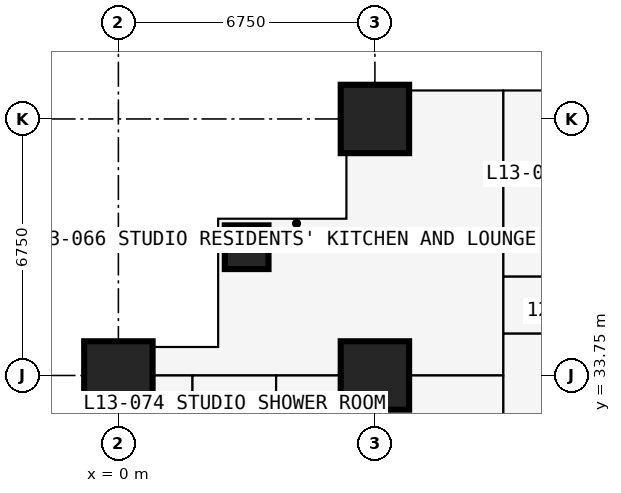
"""IFC4 building model, lengths in metres.
Left out: names, types, materials, properties, quantities, classifications, styles, units other than length and angle.
Written with IfcOpenShell. Run it as: python <this file> out.ifc"""

import sys

from ifc_helpers import new_model, si_unit, direction, frame, frame_2d, origin, origin_2d, place, context, subcontext, project, spatial, rectangle, extrude, element, fill, save


model = new_model("IFC4")
c1 = context("Model", 3, precision=1e-05, world=origin(), true_north=direction((0.0, 1.0)))
c2 = subcontext(c1, "Body", "Model", "MODEL_VIEW")
j1 = project(units=[si_unit("LENGTHUNIT", "METRE"), si_unit("PLANEANGLEUNIT", "RADIAN")], contexts=[c1])
p1 = place(None, origin())
s1 = spatial("IfcSite", under=j1, at=p1, CompositionType="ELEMENT")
p2 = place(p1, origin())
s2 = spatial("IfcBuilding", under=s1, at=p2, CompositionType="ELEMENT")
p3 = place(p2, frame((0.0, 0.0, 50.4)))
s3 = spatial("IfcBuildingStorey", under=s2, at=p3, CompositionType="ELEMENT", Elevation=50.4)
p4 = place(p3, frame((0.0, 33.75, 0.0), z_axis=(0.0, 0.0, 1.0), x_axis=(1.0, 0.0, 0.0)))
e1 = element("IfcColumn", 1, at=p4, inside=s3, PredefinedType="COLUMN", context=c2, shape_type="SweptSolid", body=[
    extrude(rectangle(XDim=1.8, YDim=1.8, at=origin_2d()), origin(), (0.0, 0.0, 1.0), 3.6),
])
p5 = place(p3, frame((3.375, 37.125, 0.0), z_axis=(0.0, 0.0, 1.0), x_axis=(1.0, 0.0, 0.0)))
e2 = element("IfcColumn", 2, at=p5, inside=s3, PredefinedType="COLUMN", context=c2, shape_type="SweptSolid", body=[
    extrude(rectangle(XDim=1.15, YDim=1.15, at=origin_2d()), origin(), (0.0, 0.0, 1.0), 3.6),
])
for number, where, z_axis, x_axis in (
    (3, (6.75, 33.75, 0.0), (0.0, 0.0, 1.0), (1.0, 0.0, 0.0)),
    (4, (6.75, 40.5, 0.0), (0.0, 0.0, 1.0), (1.0, 0.0, 0.0)),
):
    element("IfcColumn", number, at=place(p3, frame(where, z_axis=z_axis, x_axis=x_axis)), inside=s3, PredefinedType="COLUMN", context=c2, shape_type="SweptSolid", body=[
        extrude(rectangle(XDim=1.8, YDim=1.8, at=origin_2d()), origin(), (0.0, 0.0, 1.0), 3.6),
    ])
p6 = place(p3, frame((6.0, 41.25, 0.0), z_axis=(0.0, 0.0, 1.0), x_axis=(0.0, -1.0, 0.0)))
e5 = element("IfcWall", 5, at=p6, inside=s3, PredefinedType="SOLIDWALL", context=c2, shape_type="SweptSolid", body=[
    extrude(rectangle(XDim=3.375, YDim=0.3, at=frame_2d((1.688, 0.0))), origin(), (0.0, 0.0, 1.0), 3.375),
])
p7 = place(p6, frame((1.833, 0.0, 0.9)))
e6 = element("IfcOpeningElement", 6, at=p7, cuts=e5, PredefinedType="OPENING", context=c2, shape_type="SweptSolid", body=[
    extrude(rectangle(XDim=1.2, YDim=1.8, at=frame_2d((0.6, 0.9))), frame((0.0, 0.16, 0.0), z_axis=(0.0, -1.0, 0.0), x_axis=(1.0, 0.0, 0.0)), (0.0, 0.0, 1.0), 0.32),
])
p8 = place(p3, frame((6.0, 37.875, 0.0), z_axis=(0.0, 0.0, 1.0), x_axis=(-1.0, 0.0, 0.0)))
e7 = element("IfcWall", 7, at=p8, inside=s3, PredefinedType="SOLIDWALL", context=c2, shape_type="SweptSolid", body=[
    extrude(rectangle(XDim=3.375, YDim=0.3, at=frame_2d((1.688, 0.0))), origin(), (0.0, 0.0, 1.0), 3.375),
])
p9 = place(p8, frame((0.788, 0.0, 0.6)))
e8 = element("IfcOpeningElement", 8, at=p9, cuts=e7, PredefinedType="OPENING", context=c2, shape_type="SweptSolid", body=[
    extrude(rectangle(XDim=1.8, YDim=2.1, at=frame_2d((0.9, 1.05))), frame((0.0, 0.16, 0.0), z_axis=(0.0, -1.0, 0.0), x_axis=(1.0, 0.0, 0.0)), (0.0, 0.0, 1.0), 0.32),
])
p10 = place(p3, frame((2.625, 37.875, 0.0), z_axis=(0.0, 0.0, 1.0), x_axis=(0.0, -1.0, 0.0)))
e9 = element("IfcWall", 9, at=p10, inside=s3, PredefinedType="SOLIDWALL", context=c2, shape_type="SweptSolid", body=[
    extrude(rectangle(XDim=3.375, YDim=0.3, at=frame_2d((1.688, 0.0))), origin(), (0.0, 0.0, 1.0), 3.375),
])
p11 = place(p10, frame((0.788, 0.0, 0.6)))
e10 = element("IfcOpeningElement", 10, at=p11, cuts=e9, PredefinedType="OPENING", context=c2, shape_type="SweptSolid", body=[
    extrude(rectangle(XDim=1.8, YDim=2.1, at=frame_2d((0.9, 1.05))), frame((0.0, 0.16, 0.0), z_axis=(0.0, -1.0, 0.0), x_axis=(1.0, 0.0, 0.0)), (0.0, 0.0, 1.0), 0.32),
])
p12 = place(p3, frame((2.625, 34.5, 0.0), z_axis=(0.0, 0.0, 1.0), x_axis=(-1.0, 0.0, 0.0)))
e11 = element("IfcWall", 11, at=p12, inside=s3, PredefinedType="SOLIDWALL", context=c2, shape_type="SweptSolid", body=[
    extrude(rectangle(XDim=3.375, YDim=0.3, at=frame_2d((1.688, 0.0))), origin(), (0.0, 0.0, 1.0), 3.375),
])
p13 = place(p12, frame((0.343, 0.0, 0.9)))
e12 = element("IfcOpeningElement", 12, at=p13, cuts=e11, PredefinedType="OPENING", context=c2, shape_type="SweptSolid", body=[
    extrude(rectangle(XDim=1.2, YDim=1.8, at=frame_2d((0.6, 0.9))), frame((0.0, 0.16, 0.0), z_axis=(0.0, -1.0, 0.0), x_axis=(1.0, 0.0, 0.0)), (0.0, 0.0, 1.0), 0.32),
])
p14 = place(p3, frame((-0.734, 33.75, 0.0), z_axis=(0.0, 0.0, 1.0), x_axis=(1.0, 0.0, 0.0)))
e13 = element("IfcWall", 13, at=p14, inside=s3, PredefinedType="PARTITIONING", context=c2, shape_type="SweptSolid", body=[
    extrude(rectangle(XDim=10.859, YDim=0.15, at=frame_2d((5.429, 0.0))), origin(), (0.0, 0.0, 1.0), 2.877),
])
p15 = place(p3, frame((1.95, 31.75, 0.0), z_axis=(0.0, 0.0, 1.0), x_axis=(0.0, 1.0, 0.0)))
e14 = element("IfcWall", 14, at=p15, inside=s3, PredefinedType="PARTITIONING", context=c2, shape_type="SweptSolid", body=[
    extrude(rectangle(XDim=2.0, YDim=0.1, at=frame_2d((1.0, 0.0))), origin(), (0.0, 0.0, 1.0), 3.375),
])
p16 = place(p3, frame((4.15, 10.125, 0.0), z_axis=(0.0, 0.0, 1.0), x_axis=(0.0, 1.0, 0.0)))
e15 = element("IfcWall", 15, at=p16, inside=s3, PredefinedType="PARTITIONING", context=c2, shape_type="SweptSolid", body=[
    extrude(rectangle(XDim=23.625, YDim=0.15, at=frame_2d((11.812, 0.0))), origin(), (0.0, 0.0, 1.0), 3.375),
])
p17 = place(p16, frame((4.2, 0.0, 0.0)))
e16 = element("IfcOpeningElement", 16, at=p17, cuts=e15, PredefinedType="OPENING", context=c2, shape_type="SweptSolid", body=[
    extrude(rectangle(XDim=0.95, YDim=2.2, at=frame_2d((0.475, 1.1))), frame((0.0, 0.085, 0.0), z_axis=(0.0, -1.0, 0.0), x_axis=(1.0, 0.0, 0.0)), (0.0, 0.0, 1.0), 0.17),
])
p18 = place(p16, frame((10.95, 0.0, 0.0)))
e17 = element("IfcOpeningElement", 17, at=p18, cuts=e15, PredefinedType="OPENING", context=c2, shape_type="SweptSolid", body=[
    extrude(rectangle(XDim=0.95, YDim=2.2, at=frame_2d((0.475, 1.1))), frame((0.0, 0.085, 0.0), z_axis=(0.0, -1.0, 0.0), x_axis=(1.0, 0.0, 0.0)), (0.0, 0.0, 1.0), 0.17),
])
p19 = place(p16, frame((17.7, 0.0, 0.0)))
e18 = element("IfcOpeningElement", 18, at=p19, cuts=e15, PredefinedType="OPENING", context=c2, shape_type="SweptSolid", body=[
    extrude(rectangle(XDim=0.95, YDim=2.2, at=frame_2d((0.475, 1.1))), frame((0.0, 0.085, 0.0), z_axis=(0.0, -1.0, 0.0), x_axis=(1.0, 0.0, 0.0)), (0.0, 0.0, 1.0), 0.17),
])
p20 = place(p16, frame((20.5, 0.0, 0.0)))
e19 = element("IfcOpeningElement", 19, at=p20, cuts=e15, PredefinedType="OPENING", context=c2, shape_type="SweptSolid", body=[
    extrude(rectangle(XDim=0.95, YDim=2.2, at=frame_2d((0.475, 1.1))), frame((0.0, 0.085, 0.0), z_axis=(0.0, -1.0, 0.0), x_axis=(1.0, 0.0, 0.0)), (0.0, 0.0, 1.0), 0.17),
])
p21 = place(p3, frame((10.125, 30.375, 0.0), z_axis=(0.0, 0.0, 1.0), x_axis=(0.0, 1.0, 0.0)))
e20 = element("IfcWall", 20, at=p21, inside=s3, PredefinedType="PARTITIONING", context=c2, shape_type="SweptSolid", body=[
    extrude(rectangle(XDim=10.859, YDim=0.15, at=frame_2d((5.429, 0.0))), origin(), (0.0, 0.0, 1.0), 3.375),
])
p22 = place(p21, frame((4.725, 0.0, 0.0)))
e21 = element("IfcOpeningElement", 21, at=p22, cuts=e20, PredefinedType="OPENING", context=c2, shape_type="SweptSolid", body=[
    extrude(rectangle(XDim=1.0, YDim=2.2, at=frame_2d((0.5, 1.1))), frame((0.0, 0.085, 0.0), z_axis=(0.0, -1.0, 0.0), x_axis=(1.0, 0.0, 0.0)), (0.0, 0.0, 1.0), 0.17),
])
p23 = place(p3, frame((10.125, 34.85, 0.0), z_axis=(0.0, 0.0, 1.0), x_axis=(1.0, 0.0, 0.0)))
e22 = element("IfcWall", 22, at=p23, inside=s3, PredefinedType="PARTITIONING", context=c2, shape_type="SweptSolid", body=[
    extrude(rectangle(XDim=10.762, YDim=0.15, at=frame_2d((5.381, 0.0))), origin(), (0.0, 0.0, 1.0), 3.375),
])
p24 = place(p23, frame((4.9, 0.0, 0.0)))
e23 = element("IfcOpeningElement", 23, at=p24, cuts=e22, PredefinedType="OPENING", context=c2, shape_type="SweptSolid", body=[
    extrude(rectangle(XDim=0.95, YDim=2.2, at=frame_2d((0.475, 1.1))), frame((0.0, 0.085, 0.0), z_axis=(0.0, -1.0, 0.0), x_axis=(1.0, 0.0, 0.0)), (0.0, 0.0, 1.0), 0.17),
])
p25 = place(p3, frame((10.125, 36.35, 0.0), z_axis=(0.0, 0.0, 1.0), x_axis=(1.0, 0.0, 0.0)))
e24 = element("IfcWall", 24, at=p25, inside=s3, PredefinedType="PARTITIONING", context=c2, shape_type="SweptSolid", body=[
    extrude(rectangle(XDim=23.625, YDim=0.1, at=frame_2d((11.812, 0.0))), origin(), (0.0, 0.0, 1.0), 3.375),
])
p26 = place(p25, frame((21.45, 0.0, 0.0)))
e25 = element("IfcOpeningElement", 25, at=p26, cuts=e24, PredefinedType="OPENING", context=c2, shape_type="SweptSolid", body=[
    extrude(rectangle(XDim=1.0, YDim=2.2, at=frame_2d((0.5, 1.1))), frame((0.0, 0.06, 0.0), z_axis=(0.0, -1.0, 0.0), x_axis=(1.0, 0.0, 0.0)), (0.0, 0.0, 1.0), 0.12),
])
p27 = place(p25, frame((17.125, 0.0, 0.0)))
e26 = element("IfcOpeningElement", 26, at=p27, cuts=e24, PredefinedType="OPENING", context=c2, shape_type="SweptSolid", body=[
    extrude(rectangle(XDim=0.95, YDim=2.2, at=frame_2d((0.475, 1.1))), frame((0.0, 0.06, 0.0), z_axis=(0.0, -1.0, 0.0), x_axis=(1.0, 0.0, 0.0)), (0.0, 0.0, 1.0), 0.12),
])
p28 = place(p25, frame((13.7, 0.0, 0.0)))
e27 = element("IfcOpeningElement", 27, at=p28, cuts=e24, PredefinedType="OPENING", context=c2, shape_type="SweptSolid", body=[
    extrude(rectangle(XDim=0.95, YDim=2.2, at=frame_2d((0.475, 1.1))), frame((0.0, 0.06, 0.0), z_axis=(0.0, -1.0, 0.0), x_axis=(1.0, 0.0, 0.0)), (0.0, 0.0, 1.0), 0.12),
])
p29 = place(p25, frame((0.2, 0.0, 0.0)))
e28 = element("IfcOpeningElement", 28, at=p29, cuts=e24, PredefinedType="OPENING", context=c2, shape_type="SweptSolid", body=[
    extrude(rectangle(XDim=0.95, YDim=2.2, at=frame_2d((0.475, 1.1))), frame((0.0, 0.06, 0.0), z_axis=(0.0, -1.0, 0.0), x_axis=(1.0, 0.0, 0.0)), (0.0, 0.0, 1.0), 0.12),
])
p30 = place(p25, frame((3.625, 0.0, 0.0)))
e29 = element("IfcOpeningElement", 29, at=p30, cuts=e24, PredefinedType="OPENING", context=c2, shape_type="SweptSolid", body=[
    extrude(rectangle(XDim=0.95, YDim=2.2, at=frame_2d((0.475, 1.1))), frame((0.0, 0.06, 0.0), z_axis=(0.0, -1.0, 0.0), x_axis=(1.0, 0.0, 0.0)), (0.0, 0.0, 1.0), 0.12),
])
p31 = place(p25, frame((7.0, 0.0, 0.0)))
e30 = element("IfcOpeningElement", 30, at=p31, cuts=e24, PredefinedType="OPENING", context=c2, shape_type="SweptSolid", body=[
    extrude(rectangle(XDim=0.95, YDim=2.2, at=frame_2d((0.475, 1.1))), frame((0.0, 0.06, 0.0), z_axis=(0.0, -1.0, 0.0), x_axis=(1.0, 0.0, 0.0)), (0.0, 0.0, 1.0), 0.12),
])
p32 = place(p25, frame((10.375, 0.0, 0.0)))
e31 = element("IfcOpeningElement", 31, at=p32, cuts=e24, PredefinedType="OPENING", context=c2, shape_type="SweptSolid", body=[
    extrude(rectangle(XDim=0.95, YDim=2.2, at=frame_2d((0.475, 1.1))), frame((0.0, 0.06, 0.0), z_axis=(0.0, -1.0, 0.0), x_axis=(1.0, 0.0, 0.0)), (0.0, 0.0, 1.0), 0.12),
])
p33 = place(p7, origin())
e32 = element("IfcWindow", 32, at=p33, inside=s3, PartitioningType="SINGLE_PANEL", PredefinedType="WINDOW", context=c2, shape_type="SweptSolid", body=[
    extrude(rectangle(XDim=1.2, YDim=1.8, at=frame_2d((0.6, 0.9))), frame((0.0, 0.03, 0.0), z_axis=(0.0, -1.0, 0.0), x_axis=(1.0, 0.0, 0.0)), (0.0, 0.0, 1.0), 0.06),
])
fill(e6, e32)
p34 = place(p9, origin())
e33 = element("IfcWindow", 33, at=p34, inside=s3, PartitioningType="SINGLE_PANEL", PredefinedType="WINDOW", context=c2, shape_type="SweptSolid", body=[
    extrude(rectangle(XDim=1.8, YDim=2.1, at=frame_2d((0.9, 1.05))), frame((0.0, 0.03, 0.0), z_axis=(0.0, -1.0, 0.0), x_axis=(1.0, 0.0, 0.0)), (0.0, 0.0, 1.0), 0.06),
])
fill(e8, e33)
p35 = place(p11, origin())
e34 = element("IfcWindow", 34, at=p35, inside=s3, PartitioningType="SINGLE_PANEL", PredefinedType="WINDOW", context=c2, shape_type="SweptSolid", body=[
    extrude(rectangle(XDim=1.8, YDim=2.1, at=frame_2d((0.9, 1.05))), frame((0.0, 0.03, 0.0), z_axis=(0.0, -1.0, 0.0), x_axis=(1.0, 0.0, 0.0)), (0.0, 0.0, 1.0), 0.06),
])
fill(e10, e34)
p36 = place(p13, origin())
e35 = element("IfcWindow", 35, at=p36, inside=s3, PartitioningType="SINGLE_PANEL", PredefinedType="WINDOW", context=c2, shape_type="SweptSolid", body=[
    extrude(rectangle(XDim=1.2, YDim=1.8, at=frame_2d((0.6, 0.9))), frame((0.0, 0.03, 0.0), z_axis=(0.0, -1.0, 0.0), x_axis=(1.0, 0.0, 0.0)), (0.0, 0.0, 1.0), 0.06),
])
fill(e12, e35)
p37 = place(p29, origin())
e36 = element("IfcDoor", 36, at=p37, inside=s3, OperationType="SINGLE_SWING_LEFT", PredefinedType="DOOR", context=c2, shape_type="SweptSolid", body=[
    extrude(rectangle(XDim=0.95, YDim=2.2, at=frame_2d((0.475, 1.1))), frame((0.0, 0.025, 0.0), z_axis=(0.0, -1.0, 0.0), x_axis=(1.0, 0.0, 0.0)), (0.0, 0.0, 1.0), 0.05),
])
fill(e28, e36)
p38 = place(p22, origin())
e37 = element("IfcDoor", 37, at=p38, inside=s3, OperationType="SINGLE_SWING_LEFT", PredefinedType="DOOR", context=c2, shape_type="SweptSolid", body=[
    extrude(rectangle(XDim=1.0, YDim=2.2, at=frame_2d((0.5, 1.1))), frame((0.0, 0.025, 0.0), z_axis=(0.0, -1.0, 0.0), x_axis=(1.0, 0.0, 0.0)), (0.0, 0.0, 1.0), 0.05),
])
fill(e21, e37)
save(model, sys.argv[1])
